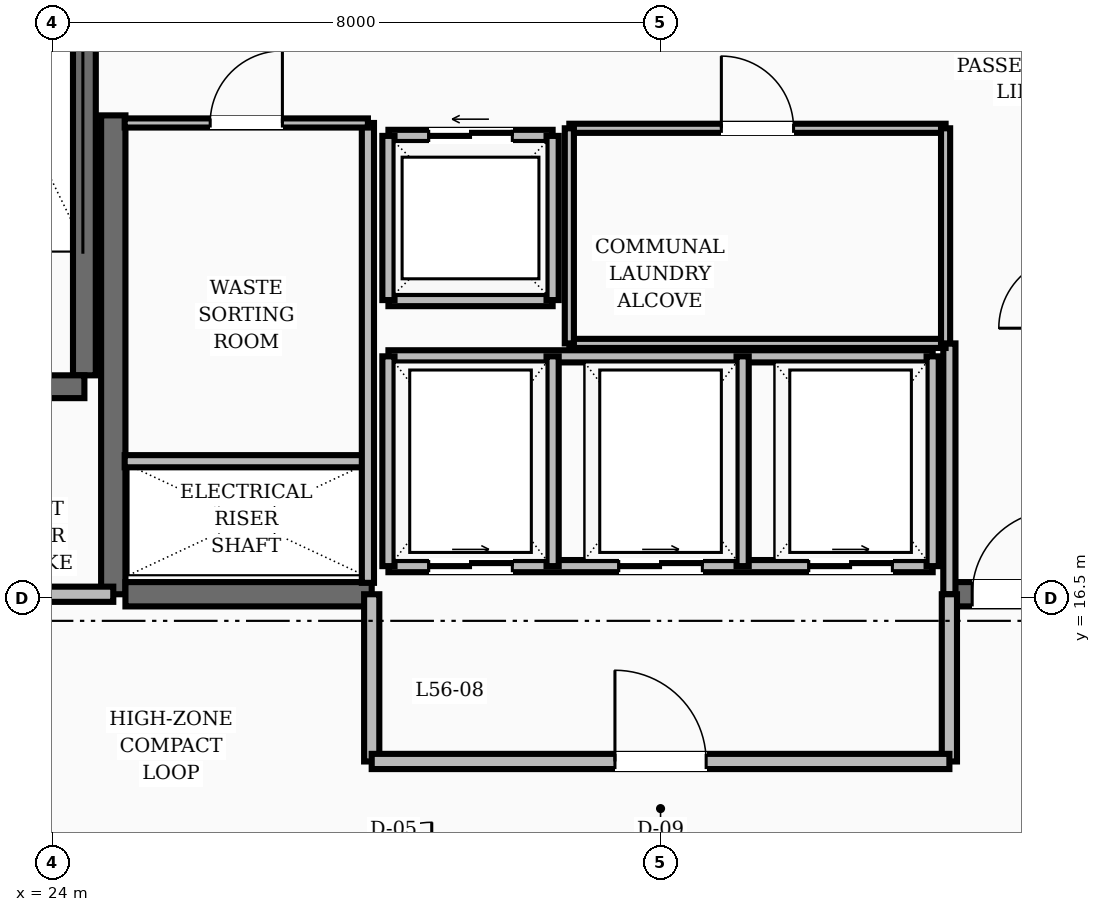
"""IFC4 building model, lengths in metres.
Left out: names, types, materials, properties, quantities, classifications, styles, units other than length and angle.
Written with IfcOpenShell. Run it as: python <this file> out.ifc"""

import sys

from ifc_helpers import new_model, si_unit, direction, frame, frame_2d, origin, place, context, subcontext, project, spatial, rectangle, extrude, element, fill, save


model = new_model("IFC4")
c1 = context("Model", 3, precision=1e-05, world=origin(), true_north=direction((0.0, 1.0)))
c2 = subcontext(c1, "Body", "Model", "MODEL_VIEW")
j1 = project(units=[si_unit("LENGTHUNIT", "METRE"), si_unit("PLANEANGLEUNIT", "RADIAN")], contexts=[c1])
p1 = place(None, origin())
s1 = spatial("IfcSite", under=j1, at=p1, CompositionType="ELEMENT")
p2 = place(p1, origin())
s2 = spatial("IfcBuilding", under=s1, at=p2, CompositionType="ELEMENT")
p3 = place(p2, frame((0.0, 0.0, 218.4)))
s3 = spatial("IfcBuildingStorey", under=s2, at=p3, CompositionType="ELEMENT", Elevation=218.4)
p4 = place(p3, frame((24.8, 16.55, 0.0), z_axis=(0.0, 0.0, 1.0), x_axis=(0.0, 1.0, 0.0)))
e1 = element("IfcWall", 1, at=p4, inside=s3, PredefinedType="SHEAR", context=c2, shape_type="SweptSolid", body=[
    extrude(rectangle(XDim=6.3, YDim=0.32, at=frame_2d((3.15, 0.0))), origin(), (0.0, 0.0, 1.0), 3.6),
])
p5 = place(p3, frame((24.96, 16.55, 0.0), z_axis=(0.0, 0.0, 1.0), x_axis=(1.0, 0.0, 0.0)))
e2 = element("IfcWall", 2, at=p5, inside=s3, PredefinedType="SHEAR", context=c2, shape_type="SweptSolid", body=[
    extrude(rectangle(XDim=3.24, YDim=0.32, at=frame_2d((1.62, 0.0))), origin(), (0.0, 0.0, 1.0), 3.6),
])
p6 = place(p3, frame((35.8, 16.55, 0.0), z_axis=(0.0, 0.0, 1.0), x_axis=(1.0, 0.0, 0.0)))
e3 = element("IfcWall", 3, at=p6, inside=s3, PredefinedType="SHEAR", context=c2, shape_type="SweptSolid", body=[
    extrude(rectangle(XDim=3.24, YDim=0.32, at=frame_2d((1.62, 0.0))), origin(), (0.0, 0.0, 1.0), 3.6),
])
p7 = place(p6, frame((0.3, 0.0, 0.0)))
e4 = element("IfcOpeningElement", 4, at=p7, cuts=e3, PredefinedType="OPENING", context=c2, shape_type="SweptSolid", body=[
    extrude(rectangle(XDim=1.1, YDim=2.1, at=frame_2d((0.55, 1.05))), frame((0.0, 0.17, 0.0), z_axis=(0.0, -1.0, 0.0), x_axis=(1.0, 0.0, 0.0)), (0.0, 0.0, 1.0), 0.34),
])
p8 = place(p3, frame((24.42, 19.43, 0.0), z_axis=(0.0, 0.0, 1.0), x_axis=(0.0, 1.0, 0.0)))
e5 = element("IfcWall", 5, at=p8, inside=s3, PredefinedType="SHEAR", context=c2, shape_type="SweptSolid", body=[
    extrude(rectangle(XDim=8.74, YDim=0.3, at=frame_2d((4.37, 0.0))), origin(), (0.0, 0.0, 1.0), 3.6),
])
p9 = place(p3, frame((20.82, 19.28, 0.0), z_axis=(0.0, 0.0, 1.0), x_axis=(1.0, 0.0, 0.0)))
e6 = element("IfcWall", 6, at=p9, inside=s3, PredefinedType="SHEAR", context=c2, shape_type="SweptSolid", body=[
    extrude(rectangle(XDim=3.6, YDim=0.3, at=frame_2d((1.8, 0.0))), origin(), (0.0, 0.0, 1.0), 3.6),
])
p10 = place(p9, frame((1.3, 0.0, 0.0)))
e7 = element("IfcOpeningElement", 7, at=p10, cuts=e6, PredefinedType="OPENING", context=c2, shape_type="SweptSolid", body=[
    extrude(rectangle(XDim=1.1, YDim=2.1, at=frame_2d((0.55, 1.05))), frame((0.0, 0.16, 0.0), z_axis=(0.0, -1.0, 0.0), x_axis=(1.0, 0.0, 0.0)), (0.0, 0.0, 1.0), 0.32),
])
p11 = place(p3, frame((20.82, 16.55, 0.0), z_axis=(0.0, 0.0, 1.0), x_axis=(1.0, 0.0, 0.0)))
e8 = element("IfcWall", 8, at=p11, inside=s3, PredefinedType="SOLIDWALL", context=c2, shape_type="SweptSolid", body=[
    extrude(rectangle(XDim=3.98, YDim=0.2, at=frame_2d((1.99, 0.0))), origin(), (0.0, 0.0, 1.0), 2.87),
])
p12 = place(p3, frame((35.8, 16.55, 0.0), z_axis=(0.0, 0.0, 1.0), x_axis=(0.0, 1.0, 0.0)))
e9 = element("IfcWall", 9, at=p12, inside=s3, PredefinedType="SOLIDWALL", context=c2, shape_type="SweptSolid", body=[
    extrude(rectangle(XDim=3.3, YDim=0.16, at=frame_2d((1.65, 0.0))), origin(), (0.0, 0.0, 1.0), 2.87),
])
for number, where, z_axis, x_axis in (
    (10, (28.2, 14.35, 0.0), (0.0, 0.0, 1.0), (0.0, 1.0, 0.0)),
    (11, (35.8, 14.35, 0.0), (0.0, 0.0, 1.0), (0.0, 1.0, 0.0)),
):
    element("IfcWall", number, at=place(p3, frame(where, z_axis=z_axis, x_axis=x_axis)), inside=s3, PredefinedType="SOLIDWALL", context=c2, shape_type="SweptSolid", body=[
        extrude(rectangle(XDim=2.2, YDim=0.2, at=frame_2d((1.1, 0.0))), origin(), (0.0, 0.0, 1.0), 2.87),
    ])
p13 = place(p3, frame((28.2, 14.35, 0.0), z_axis=(0.0, 0.0, 1.0), x_axis=(1.0, 0.0, 0.0)))
e12 = element("IfcWall", 12, at=p13, inside=s3, PredefinedType="SOLIDWALL", context=c2, shape_type="SweptSolid", body=[
    extrude(rectangle(XDim=7.6, YDim=0.2, at=frame_2d((3.8, 0.0))), origin(), (0.0, 0.0, 1.0), 2.87),
])
p14 = place(p13, frame((3.2, 0.0, 0.0)))
e13 = element("IfcOpeningElement", 13, at=p14, cuts=e12, PredefinedType="OPENING", context=c2, shape_type="SweptSolid", body=[
    extrude(rectangle(XDim=1.2, YDim=2.1, at=frame_2d((0.6, 1.05))), frame((0.0, 0.11, 0.0), z_axis=(0.0, -1.0, 0.0), x_axis=(1.0, 0.0, 0.0)), (0.0, 0.0, 1.0), 0.22),
])
p15 = place(p3, frame((28.42, 22.58, 0.0), z_axis=(0.0, 0.0, 1.0), x_axis=(1.0, 0.0, 0.0)))
e14 = element("IfcWall", 14, at=p15, inside=s3, PredefinedType="SOLIDWALL", context=c2, shape_type="SweptSolid", body=[
    extrude(rectangle(XDim=2.16, YDim=0.16, at=frame_2d((1.08, 0.0))), origin(), (0.0, 0.0, 1.0), 2.87),
])
p16 = place(p15, frame((0.53, 0.0, 0.0)))
e15 = element("IfcOpeningElement", 15, at=p16, cuts=e14, PredefinedType="OPENING", context=c2, shape_type="SweptSolid", body=[
    extrude(rectangle(XDim=1.1, YDim=2.15, at=frame_2d((0.55, 1.075))), frame((0.0, 0.09, 0.0), z_axis=(0.0, -1.0, 0.0), x_axis=(1.0, 0.0, 0.0)), (0.0, 0.0, 1.0), 0.18),
])
for number, where, z_axis, x_axis in (
    (16, (28.42, 20.42, 0.0), (0.0, 0.0, 1.0), (1.0, 0.0, 0.0)),
    (17, (28.42, 20.42, 0.0), (0.0, 0.0, 1.0), (0.0, 1.0, 0.0)),
    (18, (30.58, 20.42, 0.0), (0.0, 0.0, 1.0), (0.0, 1.0, 0.0)),
):
    element("IfcWall", number, at=place(p3, frame(where, z_axis=z_axis, x_axis=x_axis)), inside=s3, PredefinedType="SOLIDWALL", context=c2, shape_type="SweptSolid", body=[
        extrude(rectangle(XDim=2.16, YDim=0.16, at=frame_2d((1.08, 0.0))), origin(), (0.0, 0.0, 1.0), 2.87),
    ])
p17 = place(p3, frame((28.42, 16.92, 0.0), z_axis=(0.0, 0.0, 1.0), x_axis=(1.0, 0.0, 0.0)))
e19 = element("IfcWall", 19, at=p17, inside=s3, PredefinedType="SOLIDWALL", context=c2, shape_type="SweptSolid", body=[
    extrude(rectangle(XDim=7.16, YDim=0.16, at=frame_2d((3.58, 0.0))), origin(), (0.0, 0.0, 1.0), 2.87),
])
p18 = place(p17, frame((0.53, 0.0, 0.0)))
e20 = element("IfcOpeningElement", 20, at=p18, cuts=e19, PredefinedType="OPENING", context=c2, shape_type="SweptSolid", body=[
    extrude(rectangle(XDim=1.1, YDim=2.15, at=frame_2d((0.55, 1.075))), frame((0.0, 0.09, 0.0), z_axis=(0.0, -1.0, 0.0), x_axis=(1.0, 0.0, 0.0)), (0.0, 0.0, 1.0), 0.18),
])
p19 = place(p17, frame((3.03, 0.0, 0.0)))
e21 = element("IfcOpeningElement", 21, at=p19, cuts=e19, PredefinedType="OPENING", context=c2, shape_type="SweptSolid", body=[
    extrude(rectangle(XDim=1.1, YDim=2.15, at=frame_2d((0.55, 1.075))), frame((0.0, 0.09, 0.0), z_axis=(0.0, -1.0, 0.0), x_axis=(1.0, 0.0, 0.0)), (0.0, 0.0, 1.0), 0.18),
])
p20 = place(p17, frame((5.53, 0.0, 0.0)))
e22 = element("IfcOpeningElement", 22, at=p20, cuts=e19, PredefinedType="OPENING", context=c2, shape_type="SweptSolid", body=[
    extrude(rectangle(XDim=1.1, YDim=2.15, at=frame_2d((0.55, 1.075))), frame((0.0, 0.09, 0.0), z_axis=(0.0, -1.0, 0.0), x_axis=(1.0, 0.0, 0.0)), (0.0, 0.0, 1.0), 0.18),
])
p21 = place(p3, frame((28.42, 19.68, 0.0), z_axis=(0.0, 0.0, 1.0), x_axis=(1.0, 0.0, 0.0)))
e23 = element("IfcWall", 23, at=p21, inside=s3, PredefinedType="SOLIDWALL", context=c2, shape_type="SweptSolid", body=[
    extrude(rectangle(XDim=7.16, YDim=0.16, at=frame_2d((3.58, 0.0))), origin(), (0.0, 0.0, 1.0), 2.87),
])
for number, where, z_axis, x_axis in (
    (24, (28.42, 16.92, 0.0), (0.0, 0.0, 1.0), (0.0, 1.0, 0.0)),
    (25, (30.58, 16.92, 0.0), (0.0, 0.0, 1.0), (0.0, 1.0, 0.0)),
    (26, (33.08, 16.92, 0.0), (0.0, 0.0, 1.0), (0.0, 1.0, 0.0)),
    (27, (35.58, 16.92, 0.0), (0.0, 0.0, 1.0), (0.0, 1.0, 0.0)),
):
    element("IfcWall", number, at=place(p3, frame(where, z_axis=z_axis, x_axis=x_axis)), inside=s3, PredefinedType="SOLIDWALL", context=c2, shape_type="SweptSolid", body=[
        extrude(rectangle(XDim=2.76, YDim=0.16, at=frame_2d((1.38, 0.0))), origin(), (0.0, 0.0, 1.0), 2.87),
    ])
p22 = place(p3, frame((30.8, 22.68, 0.0), z_axis=(0.0, 0.0, 1.0), x_axis=(1.0, 0.0, 0.0)))
e28 = element("IfcWall", 28, at=p22, inside=s3, PredefinedType="PARTITIONING", context=c2, shape_type="SweptSolid", body=[
    extrude(rectangle(XDim=4.95, YDim=0.12, at=frame_2d((2.475, 0.0))), origin(), (0.0, 0.0, 1.0), 2.87),
])
p23 = place(p22, frame((2.0, 0.0, 0.0)))
e29 = element("IfcOpeningElement", 29, at=p23, cuts=e28, PredefinedType="OPENING", context=c2, shape_type="SweptSolid", body=[
    extrude(rectangle(XDim=0.95, YDim=2.1, at=frame_2d((0.475, 1.05))), frame((0.0, 0.07, 0.0), z_axis=(0.0, -1.0, 0.0), x_axis=(1.0, 0.0, 0.0)), (0.0, 0.0, 1.0), 0.14),
])
p24 = place(p3, frame((30.8, 19.85, 0.0), z_axis=(0.0, 0.0, 1.0), x_axis=(1.0, 0.0, 0.0)))
e30 = element("IfcWall", 30, at=p24, inside=s3, PredefinedType="PARTITIONING", context=c2, shape_type="SweptSolid", body=[
    extrude(rectangle(XDim=4.95, YDim=0.12, at=frame_2d((2.475, 0.0))), origin(), (0.0, 0.0, 1.0), 2.87),
])
for number, where, z_axis, x_axis in (
    (31, (30.8, 19.85, 0.0), (0.0, 0.0, 1.0), (0.0, 1.0, 0.0)),
    (32, (35.75, 19.85, 0.0), (0.0, 0.0, 1.0), (0.0, 1.0, 0.0)),
):
    element("IfcWall", number, at=place(p3, frame(where, z_axis=z_axis, x_axis=x_axis)), inside=s3, PredefinedType="PARTITIONING", context=c2, shape_type="SweptSolid", body=[
        extrude(rectangle(XDim=2.83, YDim=0.12, at=frame_2d((1.415, 0.0))), origin(), (0.0, 0.0, 1.0), 2.87),
    ])
p25 = place(p3, frame((24.95, 18.3, 0.0), z_axis=(0.0, 0.0, 1.0), x_axis=(1.0, 0.0, 0.0)))
e33 = element("IfcWall", 33, at=p25, inside=s3, PredefinedType="SOLIDWALL", context=c2, shape_type="SweptSolid", body=[
    extrude(rectangle(XDim=3.2, YDim=0.16, at=frame_2d((1.6, 0.0))), origin(), (0.0, 0.0, 1.0), 2.87),
])
p26 = place(p3, frame((28.15, 16.7, 0.0), z_axis=(0.0, 0.0, 1.0), x_axis=(0.0, 1.0, 0.0)))
e34 = element("IfcWall", 34, at=p26, inside=s3, PredefinedType="SOLIDWALL", context=c2, shape_type="SweptSolid", body=[
    extrude(rectangle(XDim=6.05, YDim=0.16, at=frame_2d((3.025, 0.0))), origin(), (0.0, 0.0, 1.0), 2.87),
])
p27 = place(p3, frame((24.95, 22.75, 0.0), z_axis=(0.0, 0.0, 1.0), x_axis=(1.0, 0.0, 0.0)))
e35 = element("IfcWall", 35, at=p27, inside=s3, PredefinedType="PARTITIONING", context=c2, shape_type="SweptSolid", body=[
    extrude(rectangle(XDim=3.2, YDim=0.12, at=frame_2d((1.6, 0.0))), origin(), (0.0, 0.0, 1.0), 2.87),
])
p28 = place(p27, frame((1.125, 0.0, 0.0)))
e36 = element("IfcOpeningElement", 36, at=p28, cuts=e35, PredefinedType="OPENING", context=c2, shape_type="SweptSolid", body=[
    extrude(rectangle(XDim=0.95, YDim=2.1, at=frame_2d((0.475, 1.05))), frame((0.0, 0.07, 0.0), z_axis=(0.0, -1.0, 0.0), x_axis=(1.0, 0.0, 0.0)), (0.0, 0.0, 1.0), 0.14),
])
p29 = place(p3, frame((21.635, 13.635, 0.0), z_axis=(0.0, 0.0, 1.0), x_axis=(0.92856882165, -0.371160266542, 0.0)))
e37 = element("IfcWall", 37, at=p29, inside=s3, PredefinedType="SOLIDWALL", context=c2, shape_type="SweptSolid", body=[
    extrude(rectangle(XDim=2.923, YDim=0.16, at=frame_2d((1.461, 0.0))), origin(), (0.0, 0.0, 1.0), 2.87),
])
p30 = place(p7, origin())
e38 = element("IfcDoor", 38, at=p30, inside=s3, OperationType="SINGLE_SWING_RIGHT", PredefinedType="DOOR", context=c2, shape_type="SweptSolid", body=[
    extrude(rectangle(XDim=1.1, YDim=2.1, at=frame_2d((0.55, 1.05))), frame((0.0, 0.025, 0.0), z_axis=(0.0, -1.0, 0.0), x_axis=(1.0, 0.0, 0.0)), (0.0, 0.0, 1.0), 0.05),
])
fill(e4, e38)
p31 = place(p14, origin())
e39 = element("IfcDoor", 39, at=p31, inside=s3, OperationType="SINGLE_SWING_LEFT", PredefinedType="DOOR", context=c2, shape_type="SweptSolid", body=[
    extrude(rectangle(XDim=1.2, YDim=2.1, at=frame_2d((0.6, 1.05))), frame((0.0, 0.025, 0.0), z_axis=(0.0, -1.0, 0.0), x_axis=(1.0, 0.0, 0.0)), (0.0, 0.0, 1.0), 0.05),
])
fill(e13, e39)
p32 = place(p16, origin())
e40 = element("IfcDoor", 40, at=p32, inside=s3, OperationType="SLIDING_TO_LEFT", PredefinedType="DOOR", context=c2, shape_type="SweptSolid", body=[
    extrude(rectangle(XDim=1.1, YDim=2.15, at=frame_2d((0.55, 1.075))), frame((0.0, 0.025, 0.0), z_axis=(0.0, -1.0, 0.0), x_axis=(1.0, 0.0, 0.0)), (0.0, 0.0, 1.0), 0.05),
])
fill(e15, e40)
p33 = place(p18, origin())
e41 = element("IfcDoor", 41, at=p33, inside=s3, OperationType="SLIDING_TO_RIGHT", PredefinedType="DOOR", context=c2, shape_type="SweptSolid", body=[
    extrude(rectangle(XDim=1.1, YDim=2.15, at=frame_2d((0.55, 1.075))), frame((0.0, 0.025, 0.0), z_axis=(0.0, -1.0, 0.0), x_axis=(1.0, 0.0, 0.0)), (0.0, 0.0, 1.0), 0.05),
])
fill(e20, e41)
p34 = place(p19, origin())
e42 = element("IfcDoor", 42, at=p34, inside=s3, OperationType="SLIDING_TO_RIGHT", PredefinedType="DOOR", context=c2, shape_type="SweptSolid", body=[
    extrude(rectangle(XDim=1.1, YDim=2.15, at=frame_2d((0.55, 1.075))), frame((0.0, 0.025, 0.0), z_axis=(0.0, -1.0, 0.0), x_axis=(1.0, 0.0, 0.0)), (0.0, 0.0, 1.0), 0.05),
])
fill(e21, e42)
p35 = place(p20, origin())
e43 = element("IfcDoor", 43, at=p35, inside=s3, OperationType="SLIDING_TO_RIGHT", PredefinedType="DOOR", context=c2, shape_type="SweptSolid", body=[
    extrude(rectangle(XDim=1.1, YDim=2.15, at=frame_2d((0.55, 1.075))), frame((0.0, 0.025, 0.0), z_axis=(0.0, -1.0, 0.0), x_axis=(1.0, 0.0, 0.0)), (0.0, 0.0, 1.0), 0.05),
])
fill(e22, e43)
p36 = place(p23, origin())
e44 = element("IfcDoor", 44, at=p36, inside=s3, OperationType="SINGLE_SWING_LEFT", PredefinedType="DOOR", context=c2, shape_type="SweptSolid", body=[
    extrude(rectangle(XDim=0.95, YDim=2.1, at=frame_2d((0.475, 1.05))), frame((0.0, 0.025, 0.0), z_axis=(0.0, -1.0, 0.0), x_axis=(1.0, 0.0, 0.0)), (0.0, 0.0, 1.0), 0.05),
])
fill(e29, e44)
p37 = place(p28, origin())
e45 = element("IfcDoor", 45, at=p37, inside=s3, OperationType="SINGLE_SWING_RIGHT", PredefinedType="DOOR", context=c2, shape_type="SweptSolid", body=[
    extrude(rectangle(XDim=0.95, YDim=2.1, at=frame_2d((0.475, 1.05))), frame((0.0, 0.025, 0.0), z_axis=(0.0, -1.0, 0.0), x_axis=(1.0, 0.0, 0.0)), (0.0, 0.0, 1.0), 0.05),
])
fill(e36, e45)
save(model, sys.argv[1])
